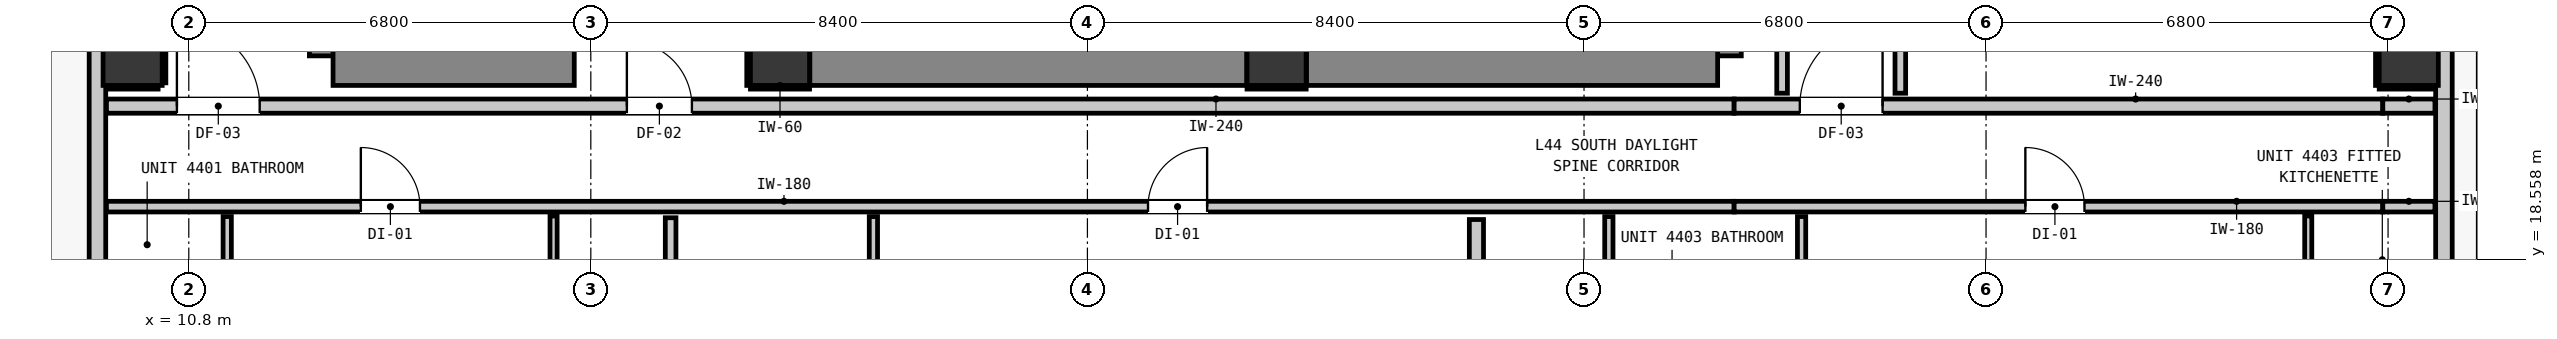
"""IFC4 building model, lengths in metres.
Left out: names, types, materials, properties, quantities, classifications, styles, units other than length and angle.
Written with IfcOpenShell. Run it as: python <this file> out.ifc"""

import sys

from ifc_helpers import new_model, si_unit, direction, frame, frame_2d, origin, origin_2d, place, context, subcontext, project, spatial, rectangle, extrude, element, fill, save


model = new_model("IFC4")
c1 = context("Model", 3, precision=1e-05, world=origin(), true_north=direction((0.0, 1.0)))
c2 = subcontext(c1, "Body", "Model", "MODEL_VIEW")
j1 = project(units=[si_unit("LENGTHUNIT", "METRE"), si_unit("PLANEANGLEUNIT", "RADIAN")], contexts=[c1])
p1 = place(None, origin())
s1 = spatial("IfcSite", under=j1, at=p1, CompositionType="ELEMENT")
p2 = place(p1, origin())
s2 = spatial("IfcBuilding", under=s1, at=p2, CompositionType="ELEMENT")
p3 = place(p2, frame((0.0, 0.0, 152.56)))
s3 = spatial("IfcBuildingStorey", under=s2, at=p3, CompositionType="ELEMENT", Elevation=152.56)
for number, where, z_axis, x_axis in (
    (1, (20.8, 22.0, 0.0), (0.0, 0.0, 1.0), (1.0, 0.0, 0.0)),
    (2, (29.2, 22.0, 0.0), (0.0, 0.0, 1.0), (1.0, 0.0, 0.0)),
):
    element("IfcColumn", number, at=place(p3, frame(where, z_axis=z_axis, x_axis=x_axis)), inside=s3, PredefinedType="COLUMN", context=c2, shape_type="SweptSolid", body=[
        extrude(rectangle(XDim=1.0, YDim=1.0, at=origin_2d()), origin(), (0.0, 0.0, 1.0), 3.32),
    ])
p4 = place(p3, frame((13.34, 22.0, 0.0), z_axis=(0.0, 0.0, 1.0), x_axis=(0.0, 1.0, 0.0)))
e3 = element("IfcWall", 3, at=p4, inside=s3, PredefinedType="SHEAR", context=c2, shape_type="SweptSolid", body=[
    extrude(rectangle(XDim=8.195, YDim=1.0, at=frame_2d((4.098, 0.0))), origin(), (0.0, 0.0, 1.0), 3.32),
])
p5 = place(p3, frame((13.24, 22.0, 0.0), z_axis=(0.0, 0.0, 1.0), x_axis=(1.0, 0.0, 0.0)))
e4 = element("IfcWall", 4, at=p5, inside=s3, PredefinedType="SHEAR", context=c2, shape_type="SweptSolid", body=[
    extrude(rectangle(XDim=4.08, YDim=1.0, at=frame_2d((2.04, 0.0))), origin(), (0.0, 0.0, 1.0), 3.32),
])
p6 = place(p3, frame((36.56, 22.0, 0.0), z_axis=(0.0, 0.0, 1.0), x_axis=(0.0, 1.0, 0.0)))
e5 = element("IfcWall", 5, at=p6, inside=s3, PredefinedType="SHEAR", context=c2, shape_type="SweptSolid", body=[
    extrude(rectangle(XDim=8.195, YDim=1.0, at=frame_2d((4.098, 0.0))), origin(), (0.0, 0.0, 1.0), 3.32),
])
p7 = place(p3, frame((29.705, 22.0, 0.0), z_axis=(0.0, 0.0, 1.0), x_axis=(1.0, 0.0, 0.0)))
e6 = element("IfcWall", 6, at=p7, inside=s3, PredefinedType="SHEAR", context=c2, shape_type="SweptSolid", body=[
    extrude(rectangle(XDim=6.955, YDim=1.0, at=frame_2d((3.478, 0.0))), origin(), (0.0, 0.0, 1.0), 3.32),
])
p8 = place(p3, frame((21.305, 22.0, 0.0), z_axis=(0.0, 0.0, 1.0), x_axis=(1.0, 0.0, 0.0)))
e7 = element("IfcWall", 7, at=p8, inside=s3, PredefinedType="SHEAR", context=c2, shape_type="SweptSolid", body=[
    extrude(rectangle(XDim=7.39, YDim=1.0, at=frame_2d((3.695, 0.0))), origin(), (0.0, 0.0, 1.0), 3.32),
])
for number, where, z_axis, x_axis in (
    (8, (9.85, 22.0, 0.0), (0.0, 0.0, 1.0), (1.0, 0.0, 0.0)),
    (9, (48.35, 22.0, 0.0), (0.0, 0.0, 1.0), (1.0, 0.0, 0.0)),
):
    element("IfcColumn", number, at=place(p3, frame(where, z_axis=z_axis, x_axis=x_axis)), inside=s3, PredefinedType="COLUMN", context=c2, shape_type="SweptSolid", body=[
        extrude(rectangle(XDim=1.0, YDim=1.0, at=origin_2d()), origin(), (0.0, 0.0, 1.0), 3.32),
    ])
p9 = place(p3, frame((9.255, 17.555, 0.0), z_axis=(0.0, 0.0, 1.0), x_axis=(0.0, 1.0, 0.0)))
e10 = element("IfcWall", 10, at=p9, inside=s3, PredefinedType="STANDARD", context=c2, shape_type="SweptSolid", body=[
    extrude(rectangle(XDim=32.29, YDim=0.28, at=frame_2d((16.145, 0.0))), origin(), (0.0, 0.0, 1.0), 3.08),
])
p10 = place(p9, frame((5.467, 0.0, 0.0)))
e11 = element("IfcOpeningElement", 11, at=p10, cuts=e10, PredefinedType="OPENING", context=c2, shape_type="SweptSolid", body=[
    extrude(rectangle(XDim=1.0, YDim=2.15, at=frame_2d((0.5, 1.075))), frame((0.0, 0.15, 0.0), z_axis=(0.0, -1.0, 0.0), x_axis=(1.0, 0.0, 0.0)), (0.0, 0.0, 1.0), 0.3),
])
p11 = place(p9, frame((30.602, 0.0, 0.85)))
e12 = element("IfcOpeningElement", 12, at=p11, cuts=e10, PredefinedType="OPENING", context=c2, shape_type="SweptSolid", body=[
    extrude(rectangle(XDim=1.35, YDim=1.85, at=frame_2d((0.675, 0.925))), frame((0.0, 0.15, 0.0), z_axis=(0.0, -1.0, 0.0), x_axis=(1.0, 0.0, 0.0)), (0.0, 0.0, 1.0), 0.3),
])
p12 = place(p3, frame((48.945, 49.845, 0.0), z_axis=(0.0, 0.0, 1.0), x_axis=(0.0, -1.0, 0.0)))
e13 = element("IfcWall", 13, at=p12, inside=s3, PredefinedType="STANDARD", context=c2, shape_type="SweptSolid", body=[
    extrude(rectangle(XDim=32.29, YDim=0.28, at=frame_2d((16.145, 0.0))), origin(), (0.0, 0.0, 1.0), 3.08),
])
p13 = place(p12, frame((0.904, 0.0, 0.0)))
e14 = element("IfcOpeningElement", 14, at=p13, cuts=e13, PredefinedType="OPENING", context=c2, shape_type="SweptSolid", body=[
    extrude(rectangle(XDim=1.0, YDim=2.15, at=frame_2d((0.5, 1.075))), frame((0.0, 0.15, 0.0), z_axis=(0.0, -1.0, 0.0), x_axis=(1.0, 0.0, 0.0)), (0.0, 0.0, 1.0), 0.3),
])
p14 = place(p12, frame((2.924, 0.0, 0.85)))
e15 = element("IfcOpeningElement", 15, at=p14, cuts=e13, PredefinedType="OPENING", context=c2, shape_type="SweptSolid", body=[
    extrude(rectangle(XDim=1.35, YDim=1.85, at=frame_2d((0.675, 0.925))), frame((0.0, 0.15, 0.0), z_axis=(0.0, -1.0, 0.0), x_axis=(1.0, 0.0, 0.0)), (0.0, 0.0, 1.0), 0.3),
])
p15 = place(p12, frame((21.186, 0.0, 0.85)))
e16 = element("IfcOpeningElement", 16, at=p15, cuts=e13, PredefinedType="OPENING", context=c2, shape_type="SweptSolid", body=[
    extrude(rectangle(XDim=1.35, YDim=1.85, at=frame_2d((0.675, 0.925))), frame((0.0, 0.15, 0.0), z_axis=(0.0, -1.0, 0.0), x_axis=(1.0, 0.0, 0.0)), (0.0, 0.0, 1.0), 0.3),
])
p16 = place(p12, frame((12.195, 0.0, 0.85)))
e17 = element("IfcOpeningElement", 17, at=p16, cuts=e13, PredefinedType="OPENING", context=c2, shape_type="SweptSolid", body=[
    extrude(rectangle(XDim=1.35, YDim=1.85, at=frame_2d((0.675, 0.925))), frame((0.0, 0.15, 0.0), z_axis=(0.0, -1.0, 0.0), x_axis=(1.0, 0.0, 0.0)), (0.0, 0.0, 1.0), 0.3),
])
p17 = place(p3, frame((9.407, 21.15, 0.0), z_axis=(0.0, 0.0, 1.0), x_axis=(1.0, 0.0, 0.0)))
e18 = element("IfcWall", 18, at=p17, inside=s3, PredefinedType="PARTITIONING", context=c2, shape_type="SweptSolid", body=[
    extrude(rectangle(XDim=27.532, YDim=0.24, at=frame_2d((13.766, 0.0))), origin(), (0.0, 0.0, 1.0), 3.08),
])
p18 = place(p17, frame((8.803, 0.0, 0.0)))
e19 = element("IfcOpeningElement", 19, at=p18, cuts=e18, PredefinedType="OPENING", context=c2, shape_type="SweptSolid", body=[
    extrude(rectangle(XDim=1.1, YDim=2.15, at=frame_2d((0.55, 1.075))), frame((0.0, 0.13, 0.0), z_axis=(0.0, -1.0, 0.0), x_axis=(1.0, 0.0, 0.0)), (0.0, 0.0, 1.0), 0.26),
])
p19 = place(p17, frame((1.192, 0.0, 0.0)))
e20 = element("IfcOpeningElement", 20, at=p19, cuts=e18, PredefinedType="OPENING", context=c2, shape_type="SweptSolid", body=[
    extrude(rectangle(XDim=1.4, YDim=2.15, at=frame_2d((0.7, 1.075))), frame((0.0, 0.13, 0.0), z_axis=(0.0, -1.0, 0.0), x_axis=(1.0, 0.0, 0.0)), (0.0, 0.0, 1.0), 0.26),
])
p20 = place(p3, frame((36.939, 21.15, 0.0), z_axis=(0.0, 0.0, 1.0), x_axis=(1.0, 0.0, 0.0)))
e21 = element("IfcWall", 21, at=p20, inside=s3, PredefinedType="PARTITIONING", context=c2, shape_type="SweptSolid", body=[
    extrude(rectangle(XDim=10.972, YDim=0.24, at=frame_2d((5.486, 0.0))), origin(), (0.0, 0.0, 1.0), 2.565),
])
p21 = place(p20, frame((1.111, 0.0, 0.0)))
e22 = element("IfcOpeningElement", 22, at=p21, cuts=e21, PredefinedType="OPENING", context=c2, shape_type="SweptSolid", body=[
    extrude(rectangle(XDim=1.4, YDim=2.15, at=frame_2d((0.7, 1.075))), frame((0.0, 0.13, 0.0), z_axis=(0.0, -1.0, 0.0), x_axis=(1.0, 0.0, 0.0)), (0.0, 0.0, 1.0), 0.26),
])
p22 = place(p3, frame((47.911, 21.15, 0.0), z_axis=(0.0, 0.0, 1.0), x_axis=(1.0, 0.0, 0.0)))
e23 = element("IfcWall", 23, at=p22, inside=s3, PredefinedType="PARTITIONING", context=c2, shape_type="SweptSolid", body=[
    extrude(rectangle(XDim=0.882, YDim=0.24, at=frame_2d((0.441, 0.0))), origin(), (0.0, 0.0, 1.0), 3.08),
])
p23 = place(p3, frame((9.407, 19.45, 0.0), z_axis=(0.0, 0.0, 1.0), x_axis=(1.0, 0.0, 0.0)))
e24 = element("IfcWall", 24, at=p23, inside=s3, PredefinedType="PARTITIONING", context=c2, shape_type="SweptSolid", body=[
    extrude(rectangle(XDim=27.532, YDim=0.18, at=frame_2d((13.766, 0.0))), origin(), (0.0, 0.0, 1.0), 3.08),
])
p24 = place(p23, frame((4.303, 0.0, 0.0)))
e25 = element("IfcOpeningElement", 25, at=p24, cuts=e24, PredefinedType="OPENING", context=c2, shape_type="SweptSolid", body=[
    extrude(rectangle(XDim=1.0, YDim=2.15, at=frame_2d((0.5, 1.075))), frame((0.0, 0.1, 0.0), z_axis=(0.0, -1.0, 0.0), x_axis=(1.0, 0.0, 0.0)), (0.0, 0.0, 1.0), 0.2),
])
p25 = place(p23, frame((17.618, 0.0, 0.0)))
e26 = element("IfcOpeningElement", 26, at=p25, cuts=e24, PredefinedType="OPENING", context=c2, shape_type="SweptSolid", body=[
    extrude(rectangle(XDim=1.0, YDim=2.15, at=frame_2d((0.5, 1.075))), frame((0.0, 0.1, 0.0), z_axis=(0.0, -1.0, 0.0), x_axis=(1.0, 0.0, 0.0)), (0.0, 0.0, 1.0), 0.2),
])
p26 = place(p3, frame((36.939, 19.45, 0.0), z_axis=(0.0, 0.0, 1.0), x_axis=(1.0, 0.0, 0.0)))
e27 = element("IfcWall", 27, at=p26, inside=s3, PredefinedType="PARTITIONING", context=c2, shape_type="SweptSolid", body=[
    extrude(rectangle(XDim=10.972, YDim=0.18, at=frame_2d((5.486, 0.0))), origin(), (0.0, 0.0, 1.0), 2.565),
])
p27 = place(p26, frame((4.926, 0.0, 0.0)))
e28 = element("IfcOpeningElement", 28, at=p27, cuts=e27, PredefinedType="OPENING", context=c2, shape_type="SweptSolid", body=[
    extrude(rectangle(XDim=1.0, YDim=2.15, at=frame_2d((0.5, 1.075))), frame((0.0, 0.1, 0.0), z_axis=(0.0, -1.0, 0.0), x_axis=(1.0, 0.0, 0.0)), (0.0, 0.0, 1.0), 0.2),
])
p28 = place(p3, frame((47.911, 19.45, 0.0), z_axis=(0.0, 0.0, 1.0), x_axis=(1.0, 0.0, 0.0)))
e29 = element("IfcWall", 29, at=p28, inside=s3, PredefinedType="PARTITIONING", context=c2, shape_type="SweptSolid", body=[
    extrude(rectangle(XDim=0.882, YDim=0.18, at=frame_2d((0.441, 0.0))), origin(), (0.0, 0.0, 1.0), 3.08),
])
p29 = place(p3, frame((32.58, 15.407, 0.0), z_axis=(0.0, 0.0, 1.0), x_axis=(0.0, 1.0, 0.0)))
e30 = element("IfcWall", 30, at=p29, inside=s3, PredefinedType="PARTITIONING", context=c2, shape_type="SweptSolid", body=[
    extrude(rectangle(XDim=3.825, YDim=0.24, at=frame_2d((1.913, 0.0))), origin(), (0.0, 0.0, 1.0), 3.08),
])
p30 = place(p29, frame((1.568, 0.0, 0.0)))
e31 = element("IfcOpeningElement", 31, at=p30, cuts=e30, PredefinedType="OPENING", context=c2, shape_type="SweptSolid", body=[
    extrude(rectangle(XDim=0.9, YDim=2.1, at=frame_2d((0.45, 1.05))), frame((0.0, 0.13, 0.0), z_axis=(0.0, -1.0, 0.0), x_axis=(1.0, 0.0, 0.0)), (0.0, 0.0, 1.0), 0.26),
])
p31 = place(p3, frame((18.95, 15.407, 0.0), z_axis=(0.0, 0.0, 1.0), x_axis=(0.0, 1.0, 0.0)))
e32 = element("IfcWall", 32, at=p31, inside=s3, PredefinedType="PARTITIONING", context=c2, shape_type="SweptSolid", body=[
    extrude(rectangle(XDim=3.855, YDim=0.18, at=frame_2d((1.927, 0.0))), origin(), (0.0, 0.0, 1.0), 3.08),
])
p32 = place(p3, frame((37.75, 21.368, 0.0), z_axis=(0.0, 0.0, 1.0), x_axis=(0.0, 1.0, 0.0)))
e33 = element("IfcWall", 33, at=p32, inside=s3, PredefinedType="PARTITIONING", context=c2, shape_type="SweptSolid", body=[
    extrude(rectangle(XDim=18.694, YDim=0.18, at=frame_2d((9.347, 0.0))), origin(), (0.0, 0.0, 1.0), 3.08),
])
p33 = place(p3, frame((39.75, 21.368, 0.0), z_axis=(0.0, 0.0, 1.0), x_axis=(0.0, 1.0, 0.0)))
e34 = element("IfcWall", 34, at=p33, inside=s3, PredefinedType="PARTITIONING", context=c2, shape_type="SweptSolid", body=[
    extrude(rectangle(XDim=3.964, YDim=0.18, at=frame_2d((1.982, 0.0))), origin(), (0.0, 0.0, 1.0), 3.08),
])
p34 = place(p3, frame((11.45, 16.278, 0.0), z_axis=(0.0, 0.0, 1.0), x_axis=(0.0, 1.0, 0.0)))
e35 = element("IfcWall", 35, at=p34, inside=s3, PredefinedType="PARTITIONING", context=c2, shape_type="SweptSolid", body=[
    extrude(rectangle(XDim=3.004, YDim=0.14, at=frame_2d((1.502, 0.0))), origin(), (0.0, 0.0, 1.0), 2.565),
])
p35 = place(p34, frame((0.717, 0.0, 0.0)))
e36 = element("IfcOpeningElement", 36, at=p35, cuts=e35, PredefinedType="OPENING", context=c2, shape_type="SweptSolid", body=[
    extrude(rectangle(XDim=0.86, YDim=2.02, at=frame_2d((0.43, 1.01))), frame((0.0, 0.08, 0.0), z_axis=(0.0, -1.0, 0.0), x_axis=(1.0, 0.0, 0.0)), (0.0, 0.0, 1.0), 0.16),
])
p36 = place(p3, frame((22.38, 15.407, 0.0), z_axis=(0.0, 0.0, 1.0), x_axis=(0.0, 1.0, 0.0)))
e37 = element("IfcWall", 37, at=p36, inside=s3, PredefinedType="PARTITIONING", context=c2, shape_type="SweptSolid", body=[
    extrude(rectangle(XDim=3.875, YDim=0.14, at=frame_2d((1.938, 0.0))), origin(), (0.0, 0.0, 1.0), 3.08),
])
p37 = place(p36, frame((1.588, 0.0, 0.0)))
e38 = element("IfcOpeningElement", 38, at=p37, cuts=e37, PredefinedType="OPENING", context=c2, shape_type="SweptSolid", body=[
    extrude(rectangle(XDim=0.86, YDim=2.02, at=frame_2d((0.43, 1.01))), frame((0.0, 0.08, 0.0), z_axis=(0.0, -1.0, 0.0), x_axis=(1.0, 0.0, 0.0)), (0.0, 0.0, 1.0), 0.16),
])
p38 = place(p3, frame((34.82, 15.407, 0.0), z_axis=(0.0, 0.0, 1.0), x_axis=(0.0, 1.0, 0.0)))
e39 = element("IfcWall", 39, at=p38, inside=s3, PredefinedType="PARTITIONING", context=c2, shape_type="SweptSolid", body=[
    extrude(rectangle(XDim=3.875, YDim=0.14, at=frame_2d((1.938, 0.0))), origin(), (0.0, 0.0, 1.0), 3.08),
])
p39 = place(p3, frame((38.08, 15.407, 0.0), z_axis=(0.0, 0.0, 1.0), x_axis=(0.0, 1.0, 0.0)))
e40 = element("IfcWall", 40, at=p39, inside=s3, PredefinedType="PARTITIONING", context=c2, shape_type="SweptSolid", body=[
    extrude(rectangle(XDim=3.875, YDim=0.14, at=frame_2d((1.938, 0.0))), origin(), (0.0, 0.0, 1.0), 3.08),
])
p40 = place(p39, frame((1.588, 0.0, 0.0)))
e41 = element("IfcOpeningElement", 41, at=p40, cuts=e40, PredefinedType="OPENING", context=c2, shape_type="SweptSolid", body=[
    extrude(rectangle(XDim=0.86, YDim=2.02, at=frame_2d((0.43, 1.01))), frame((0.0, 0.08, 0.0), z_axis=(0.0, -1.0, 0.0), x_axis=(1.0, 0.0, 0.0)), (0.0, 0.0, 1.0), 0.16),
])
p41 = place(p3, frame((16.97, 15.407, 0.0), z_axis=(0.0, 0.0, 1.0), x_axis=(0.0, 1.0, 0.0)))
e42 = element("IfcWall", 42, at=p41, inside=s3, PredefinedType="PARTITIONING", context=c2, shape_type="SweptSolid", body=[
    extrude(rectangle(XDim=3.885, YDim=0.12, at=frame_2d((1.942, 0.0))), origin(), (0.0, 0.0, 1.0), 3.08),
])
p42 = place(p41, frame((1.568, 0.0, 0.0)))
e43 = element("IfcOpeningElement", 43, at=p42, cuts=e42, PredefinedType="OPENING", context=c2, shape_type="SweptSolid", body=[
    extrude(rectangle(XDim=0.9, YDim=2.1, at=frame_2d((0.45, 1.05))), frame((0.0, 0.07, 0.0), z_axis=(0.0, -1.0, 0.0), x_axis=(1.0, 0.0, 0.0)), (0.0, 0.0, 1.0), 0.14),
])
p43 = place(p3, frame((46.65, 15.475, 0.0), z_axis=(0.0, 0.0, 1.0), x_axis=(0.0, 1.0, 0.0)))
e44 = element("IfcWall", 44, at=p43, inside=s3, PredefinedType="PARTITIONING", context=c2, shape_type="SweptSolid", body=[
    extrude(rectangle(XDim=3.817, YDim=0.12, at=frame_2d((1.908, 0.0))), origin(), (0.0, 0.0, 1.0), 3.08),
])
p44 = place(p43, frame((1.5, 0.0, 0.0)))
e45 = element("IfcOpeningElement", 45, at=p44, cuts=e44, PredefinedType="OPENING", context=c2, shape_type="SweptSolid", body=[
    extrude(rectangle(XDim=0.9, YDim=2.1, at=frame_2d((0.45, 1.05))), frame((0.0, 0.07, 0.0), z_axis=(0.0, -1.0, 0.0), x_axis=(1.0, 0.0, 0.0)), (0.0, 0.0, 1.0), 0.14),
])
for number, where, z_axis, x_axis in (
    (46, (20.3, 21.468, 0.0), (0.0, 0.0, 1.0), (1.0, 0.0, 0.0)),
    (47, (20.268, 21.5, 0.0), (0.0, 0.0, 1.0), (0.0, 1.0, 0.0)),
    (48, (28.7, 21.468, 0.0), (0.0, 0.0, 1.0), (1.0, 0.0, 0.0)),
):
    element("IfcWall", number, at=place(p3, frame(where, z_axis=z_axis, x_axis=x_axis)), inside=s3, PredefinedType="PARTITIONING", context=c2, shape_type="SweptSolid", body=[
        extrude(rectangle(XDim=1.0, YDim=0.06, at=frame_2d((0.5, 0.0))), origin(), (0.0, 0.0, 1.0), 1.45),
    ])
p45 = place(p3, frame((9.41, 21.468, 0.0), z_axis=(0.0, 0.0, 1.0), x_axis=(1.0, 0.0, 0.0)))
e49 = element("IfcWall", 49, at=p45, inside=s3, PredefinedType="PARTITIONING", context=c2, shape_type="SweptSolid", body=[
    extrude(rectangle(XDim=0.871, YDim=0.06, at=frame_2d((0.436, 0.0))), origin(), (0.0, 0.0, 1.0), 1.45),
])
p46 = place(p3, frame((10.382, 21.544, 0.0), z_axis=(0.0, 0.0, 1.0), x_axis=(0.0, 1.0, 0.0)))
e50 = element("IfcWall", 50, at=p46, inside=s3, PredefinedType="PARTITIONING", context=c2, shape_type="SweptSolid", body=[
    extrude(rectangle(XDim=0.956, YDim=0.06, at=frame_2d((0.478, 0.0))), origin(), (0.0, 0.0, 1.0), 1.45),
])
p47 = place(p3, frame((47.85, 21.468, 0.0), z_axis=(0.0, 0.0, 1.0), x_axis=(1.0, 0.0, 0.0)))
e51 = element("IfcWall", 51, at=p47, inside=s3, PredefinedType="PARTITIONING", context=c2, shape_type="SweptSolid", body=[
    extrude(rectangle(XDim=0.94, YDim=0.06, at=frame_2d((0.47, 0.0))), origin(), (0.0, 0.0, 1.0), 1.45),
])
p48 = place(p3, frame((47.818, 21.5, 0.0), z_axis=(0.0, 0.0, 1.0), x_axis=(0.0, 1.0, 0.0)))
e52 = element("IfcWall", 52, at=p48, inside=s3, PredefinedType="PARTITIONING", context=c2, shape_type="SweptSolid", body=[
    extrude(rectangle(XDim=1.0, YDim=0.06, at=frame_2d((0.5, 0.0))), origin(), (0.0, 0.0, 1.0), 1.45),
])
p49 = place(p18, origin())
e53 = element("IfcDoor", 53, at=p49, inside=s3, OperationType="SINGLE_SWING_LEFT", PredefinedType="DOOR", context=c2, shape_type="SweptSolid", body=[
    extrude(rectangle(XDim=1.1, YDim=2.15, at=frame_2d((0.55, 1.075))), frame((0.0, 0.025, 0.0), z_axis=(0.0, -1.0, 0.0), x_axis=(1.0, 0.0, 0.0)), (0.0, 0.0, 1.0), 0.05),
])
fill(e19, e53)
p50 = place(p19, origin())
e54 = element("IfcDoor", 54, at=p50, inside=s3, OperationType="SINGLE_SWING_LEFT", PredefinedType="DOOR", context=c2, shape_type="SweptSolid", body=[
    extrude(rectangle(XDim=1.4, YDim=2.15, at=frame_2d((0.7, 1.075))), frame((0.0, 0.025, 0.0), z_axis=(0.0, -1.0, 0.0), x_axis=(1.0, 0.0, 0.0)), (0.0, 0.0, 1.0), 0.05),
])
fill(e20, e54)
p51 = place(p21, origin())
e55 = element("IfcDoor", 55, at=p51, inside=s3, OperationType="SINGLE_SWING_RIGHT", PredefinedType="DOOR", context=c2, shape_type="SweptSolid", body=[
    extrude(rectangle(XDim=1.4, YDim=2.15, at=frame_2d((0.7, 1.075))), frame((0.0, 0.025, 0.0), z_axis=(0.0, -1.0, 0.0), x_axis=(1.0, 0.0, 0.0)), (0.0, 0.0, 1.0), 0.05),
])
fill(e22, e55)
p52 = place(p24, origin())
e56 = element("IfcDoor", 56, at=p52, inside=s3, OperationType="SINGLE_SWING_LEFT", PredefinedType="DOOR", context=c2, shape_type="SweptSolid", body=[
    extrude(rectangle(XDim=1.0, YDim=2.15, at=frame_2d((0.5, 1.075))), frame((0.0, 0.025, 0.0), z_axis=(0.0, -1.0, 0.0), x_axis=(1.0, 0.0, 0.0)), (0.0, 0.0, 1.0), 0.05),
])
fill(e25, e56)
p53 = place(p25, origin())
e57 = element("IfcDoor", 57, at=p53, inside=s3, OperationType="SINGLE_SWING_RIGHT", PredefinedType="DOOR", context=c2, shape_type="SweptSolid", body=[
    extrude(rectangle(XDim=1.0, YDim=2.15, at=frame_2d((0.5, 1.075))), frame((0.0, 0.025, 0.0), z_axis=(0.0, -1.0, 0.0), x_axis=(1.0, 0.0, 0.0)), (0.0, 0.0, 1.0), 0.05),
])
fill(e26, e57)
p54 = place(p27, origin())
e58 = element("IfcDoor", 58, at=p54, inside=s3, OperationType="SINGLE_SWING_LEFT", PredefinedType="DOOR", context=c2, shape_type="SweptSolid", body=[
    extrude(rectangle(XDim=1.0, YDim=2.15, at=frame_2d((0.5, 1.075))), frame((0.0, 0.025, 0.0), z_axis=(0.0, -1.0, 0.0), x_axis=(1.0, 0.0, 0.0)), (0.0, 0.0, 1.0), 0.05),
])
fill(e28, e58)
save(model, sys.argv[1])
